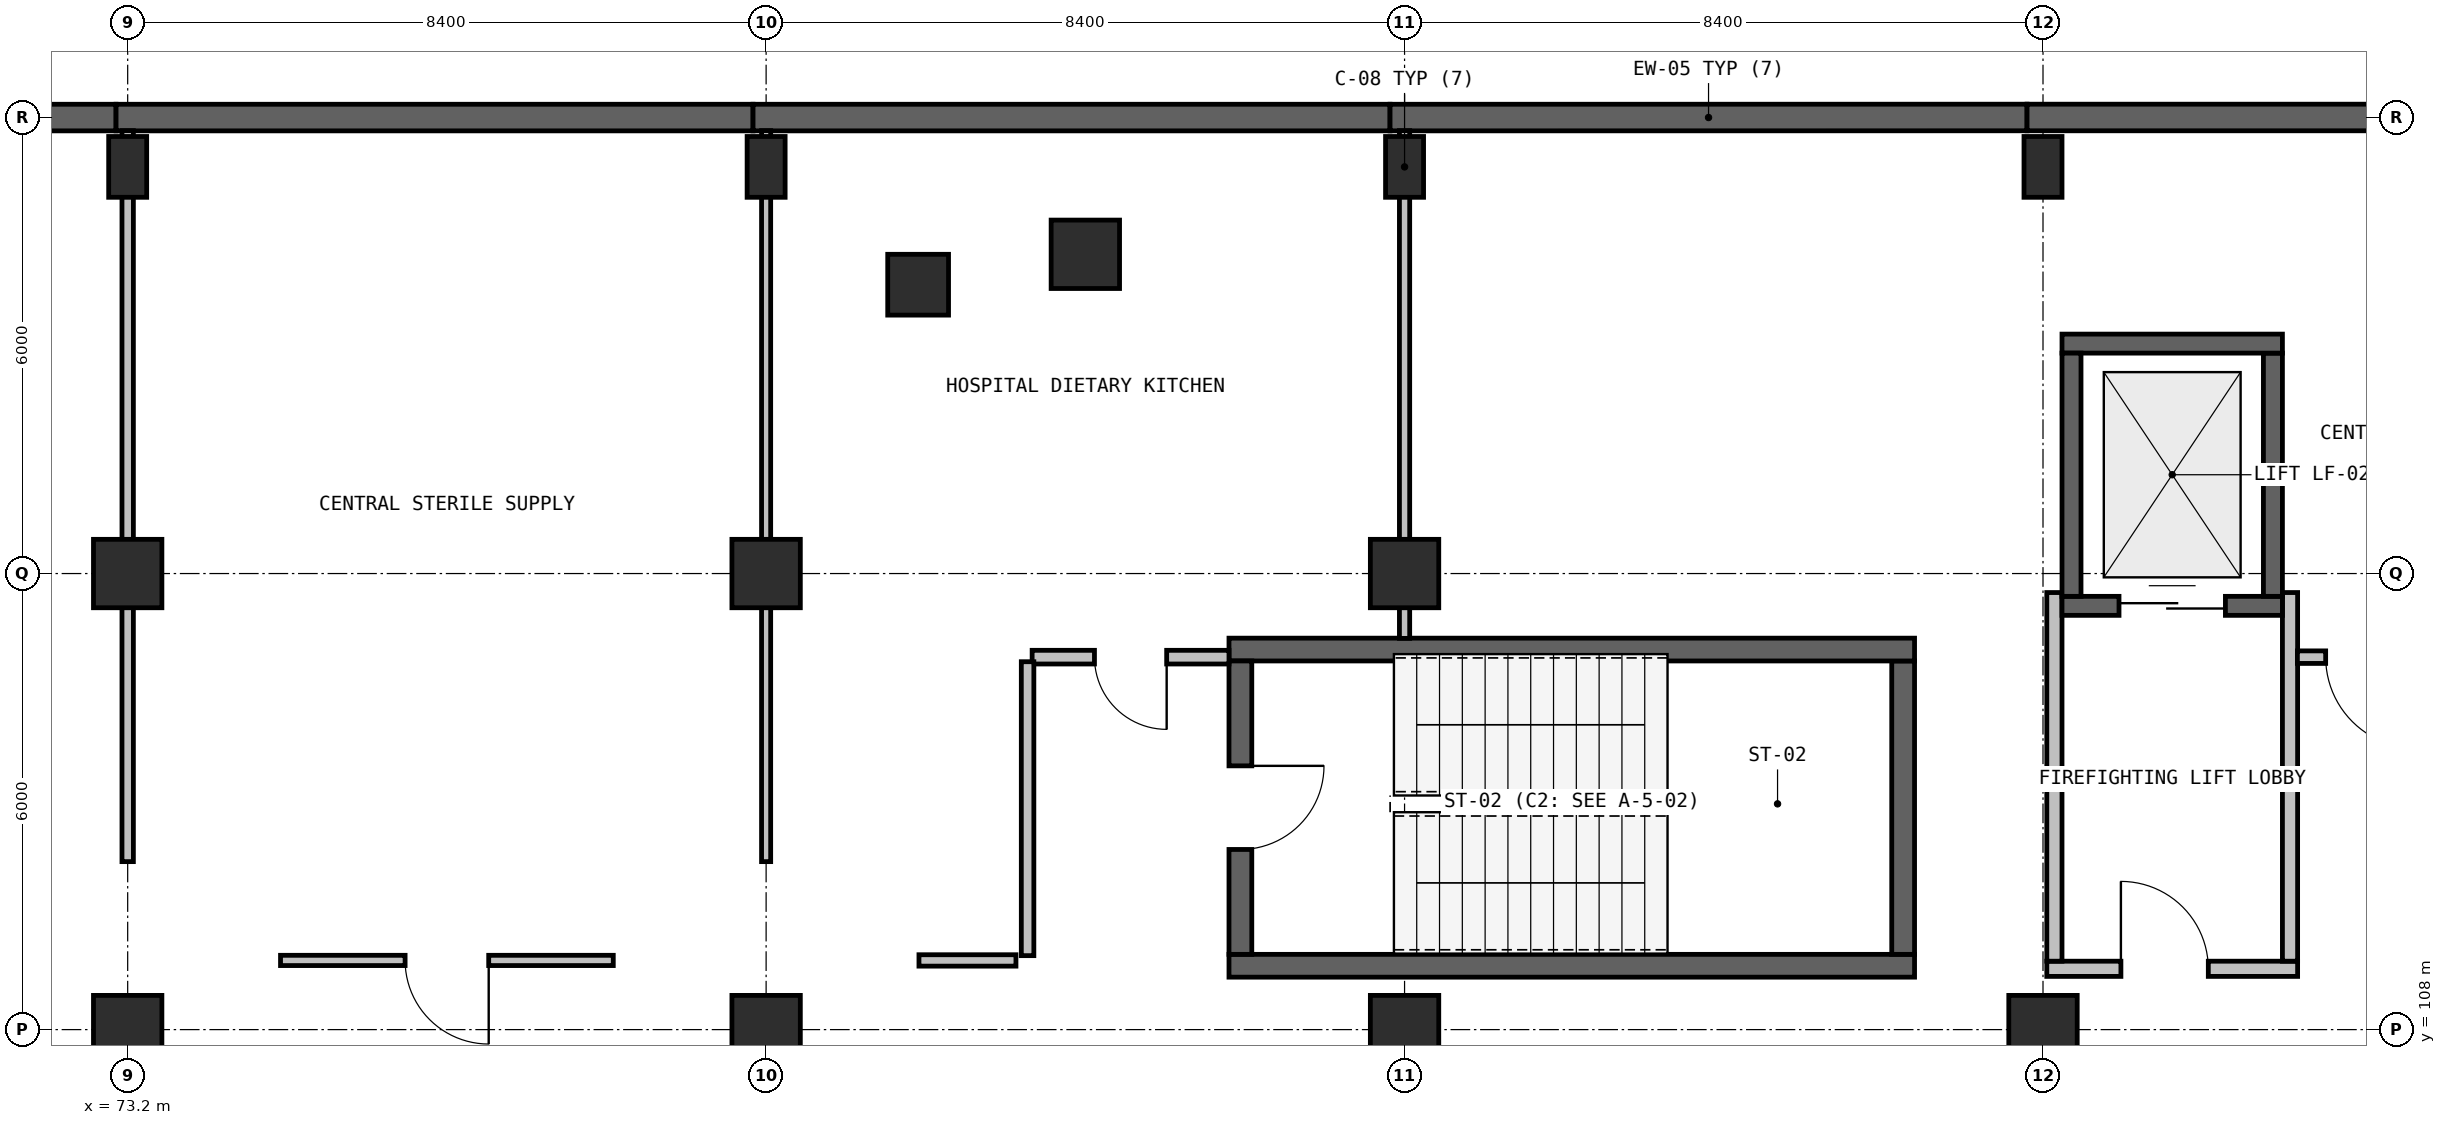
"""IFC4 building model, lengths in metres.
Left out: names, types, materials, properties, quantities, classifications, styles, units other than length and angle.
Written with IfcOpenShell. Run it as: python <this file> out.ifc"""

import sys

from ifc_helpers import new_model, si_unit, direction, frame, frame_2d, origin, origin_2d, place, context, subcontext, project, spatial, rectangle, extrude, element, fill, save


model = new_model("IFC4")
c1 = context("Model", 3, precision=1e-05, world=origin(), true_north=direction((0.0, 1.0)))
c2 = subcontext(c1, "Body", "Model", "MODEL_VIEW")
j1 = project(units=[si_unit("LENGTHUNIT", "METRE"), si_unit("PLANEANGLEUNIT", "RADIAN")], contexts=[c1])
p1 = place(None, origin())
s1 = spatial("IfcSite", under=j1, at=p1, CompositionType="ELEMENT")
p2 = place(p1, origin())
s2 = spatial("IfcBuilding", under=s1, at=p2, CompositionType="ELEMENT")
p3 = place(p2, frame((0.0, 0.0, -4.8)))
s3 = spatial("IfcBuildingStorey", under=s2, at=p3, CompositionType="ELEMENT", Elevation=-4.8)
p4 = place(p3, frame((83.6, 117.8, 0.0), z_axis=(0.0, 0.0, 1.0), x_axis=(1.0, 0.0, 0.0)))
e1 = element("IfcColumn", 1, at=p4, inside=s3, PredefinedType="COLUMN", context=c2, shape_type="SweptSolid", body=[
    extrude(rectangle(XDim=0.8, YDim=0.8, at=origin_2d()), origin(), (0.0, 0.0, 1.0), 4.8),
])
for number, where, z_axis, x_axis in (
    (2, (85.8, 118.2, 0.0), (0.0, 0.0, 1.0), (1.0, 0.0, 0.0)),
    (3, (73.2, 108.0, 0.0), (0.0, 0.0, 1.0), (1.0, 0.0, 0.0)),
    (4, (73.2, 114.0, 0.0), (0.0, 0.0, 1.0), (1.0, 0.0, 0.0)),
):
    element("IfcColumn", number, at=place(p3, frame(where, z_axis=z_axis, x_axis=x_axis)), inside=s3, PredefinedType="COLUMN", context=c2, shape_type="SweptSolid", body=[
        extrude(rectangle(XDim=0.9, YDim=0.9, at=origin_2d()), origin(), (0.0, 0.0, 1.0), 4.8),
    ])
p5 = place(p3, frame((73.2, 119.35, 0.0), z_axis=(0.0, 0.0, 1.0), x_axis=(1.0, 0.0, 0.0)))
e5 = element("IfcColumn", 5, at=p5, inside=s3, PredefinedType="COLUMN", context=c2, shape_type="SweptSolid", body=[
    extrude(rectangle(XDim=0.5, YDim=0.8, at=origin_2d()), origin(), (0.0, 0.0, 1.0), 4.8),
])
for number, where, z_axis, x_axis in (
    (6, (81.6, 108.0, 0.0), (0.0, 0.0, 1.0), (1.0, 0.0, 0.0)),
    (7, (81.6, 114.0, 0.0), (0.0, 0.0, 1.0), (1.0, 0.0, 0.0)),
):
    element("IfcColumn", number, at=place(p3, frame(where, z_axis=z_axis, x_axis=x_axis)), inside=s3, PredefinedType="COLUMN", context=c2, shape_type="SweptSolid", body=[
        extrude(rectangle(XDim=0.9, YDim=0.9, at=origin_2d()), origin(), (0.0, 0.0, 1.0), 4.8),
    ])
p6 = place(p3, frame((81.6, 119.35, 0.0), z_axis=(0.0, 0.0, 1.0), x_axis=(1.0, 0.0, 0.0)))
e8 = element("IfcColumn", 8, at=p6, inside=s3, PredefinedType="COLUMN", context=c2, shape_type="SweptSolid", body=[
    extrude(rectangle(XDim=0.5, YDim=0.8, at=origin_2d()), origin(), (0.0, 0.0, 1.0), 4.8),
])
for number, where, z_axis, x_axis in (
    (9, (90.0, 108.0, 0.0), (0.0, 0.0, 1.0), (1.0, 0.0, 0.0)),
    (10, (90.0, 114.0, 0.0), (0.0, 0.0, 1.0), (1.0, 0.0, 0.0)),
):
    element("IfcColumn", number, at=place(p3, frame(where, z_axis=z_axis, x_axis=x_axis)), inside=s3, PredefinedType="COLUMN", context=c2, shape_type="SweptSolid", body=[
        extrude(rectangle(XDim=0.9, YDim=0.9, at=origin_2d()), origin(), (0.0, 0.0, 1.0), 4.8),
    ])
p7 = place(p3, frame((90.0, 119.35, 0.0), z_axis=(0.0, 0.0, 1.0), x_axis=(1.0, 0.0, 0.0)))
e11 = element("IfcColumn", 11, at=p7, inside=s3, PredefinedType="COLUMN", context=c2, shape_type="SweptSolid", body=[
    extrude(rectangle(XDim=0.5, YDim=0.8, at=origin_2d()), origin(), (0.0, 0.0, 1.0), 4.8),
])
p8 = place(p3, frame((98.4, 108.0, 0.0), z_axis=(0.0, 0.0, 1.0), x_axis=(1.0, 0.0, 0.0)))
e12 = element("IfcColumn", 12, at=p8, inside=s3, PredefinedType="COLUMN", context=c2, shape_type="SweptSolid", body=[
    extrude(rectangle(XDim=0.9, YDim=0.9, at=origin_2d()), origin(), (0.0, 0.0, 1.0), 4.8),
])
p9 = place(p3, frame((98.4, 119.35, 0.0), z_axis=(0.0, 0.0, 1.0), x_axis=(1.0, 0.0, 0.0)))
e13 = element("IfcColumn", 13, at=p9, inside=s3, PredefinedType="COLUMN", context=c2, shape_type="SweptSolid", body=[
    extrude(rectangle(XDim=0.5, YDim=0.8, at=origin_2d()), origin(), (0.0, 0.0, 1.0), 4.8),
])
p10 = place(p3, frame((64.666, 119.999, 0.0), z_axis=(0.0, 0.0, 1.0), x_axis=(1.0, 0.0, 0.0)))
e14 = element("IfcWall", 14, at=p10, inside=s3, PredefinedType="SHEAR", context=c2, shape_type="SweptSolid", body=[
    extrude(rectangle(XDim=8.381, YDim=0.35, at=frame_2d((4.19, 0.0))), origin(), (0.0, 0.0, 1.0), 4.45),
])
p11 = place(p3, frame((73.047, 119.999, 0.0), z_axis=(0.0, 0.0, 1.0), x_axis=(1.0, 0.0, 0.0)))
e15 = element("IfcWall", 15, at=p11, inside=s3, PredefinedType="SHEAR", context=c2, shape_type="SweptSolid", body=[
    extrude(rectangle(XDim=8.381, YDim=0.35, at=frame_2d((4.19, 0.0))), origin(), (0.0, 0.0, 1.0), 4.45),
])
p12 = place(p3, frame((81.428, 119.999, 0.0), z_axis=(0.0, 0.0, 1.0), x_axis=(1.0, 0.0, 0.0)))
e16 = element("IfcWall", 16, at=p12, inside=s3, PredefinedType="SHEAR", context=c2, shape_type="SweptSolid", body=[
    extrude(rectangle(XDim=8.381, YDim=0.35, at=frame_2d((4.19, 0.0))), origin(), (0.0, 0.0, 1.0), 4.45),
])
p13 = place(p3, frame((89.809, 119.999, 0.0), z_axis=(0.0, 0.0, 1.0), x_axis=(0.999999993211, 0.000116522954, 0.0)))
e17 = element("IfcWall", 17, at=p13, inside=s3, PredefinedType="SHEAR", context=c2, shape_type="SweptSolid", body=[
    extrude(rectangle(XDim=8.381, YDim=0.35, at=frame_2d((4.19, 0.0))), origin(), (0.0, 0.0, 1.0), 4.45),
])
p14 = place(p3, frame((98.19, 120.0, 0.0), z_axis=(0.0, 0.0, 1.0), x_axis=(1.0, 0.0, 0.0)))
e18 = element("IfcWall", 18, at=p14, inside=s3, PredefinedType="SHEAR", context=c2, shape_type="SweptSolid", body=[
    extrude(rectangle(XDim=8.381, YDim=0.35, at=frame_2d((4.19, 0.0))), origin(), (0.0, 0.0, 1.0), 4.45),
])
p15 = place(p3, frame((87.69, 108.84, 0.0), z_axis=(0.0, 0.0, 1.0), x_axis=(1.0, 0.0, 0.0)))
e19 = element("IfcWall", 19, at=p15, inside=s3, PredefinedType="SHEAR", context=c2, shape_type="SweptSolid", body=[
    extrude(rectangle(XDim=9.02, YDim=0.3, at=frame_2d((4.51, 0.0))), origin(), (0.0, 0.0, 1.0), 4.45),
])
p16 = place(p3, frame((96.56, 108.99, 0.0), z_axis=(0.0, 0.0, 1.0), x_axis=(0.0, 1.0, 0.0)))
e20 = element("IfcWall", 20, at=p16, inside=s3, PredefinedType="SHEAR", context=c2, shape_type="SweptSolid", body=[
    extrude(rectangle(XDim=3.86, YDim=0.3, at=frame_2d((1.93, 0.0))), origin(), (0.0, 0.0, 1.0), 4.45),
])
p17 = place(p3, frame((96.71, 113.0, 0.0), z_axis=(0.0, 0.0, 1.0), x_axis=(-1.0, 0.0, 0.0)))
e21 = element("IfcWall", 21, at=p17, inside=s3, PredefinedType="SHEAR", context=c2, shape_type="SweptSolid", body=[
    extrude(rectangle(XDim=9.02, YDim=0.3, at=frame_2d((4.51, 0.0))), origin(), (0.0, 0.0, 1.0), 4.45),
])
p18 = place(p3, frame((87.84, 112.85, 0.0), z_axis=(0.0, 0.0, 1.0), x_axis=(0.0, -1.0, 0.0)))
e22 = element("IfcWall", 22, at=p18, inside=s3, PredefinedType="SHEAR", context=c2, shape_type="SweptSolid", body=[
    extrude(rectangle(XDim=3.86, YDim=0.3, at=frame_2d((1.93, 0.0))), origin(), (0.0, 0.0, 1.0), 4.45),
])
p19 = place(p18, frame((1.38, 0.0, 0.0)))
e23 = element("IfcOpeningElement", 23, at=p19, cuts=e22, PredefinedType="OPENING", context=c2, shape_type="SweptSolid", body=[
    extrude(rectangle(XDim=1.1, YDim=2.15, at=frame_2d((0.55, 1.075))), frame((0.0, 0.16, 0.0), z_axis=(0.0, -1.0, 0.0), x_axis=(1.0, 0.0, 0.0)), (0.0, 0.0, 1.0), 0.32),
])
p20 = place(p3, frame((98.45, 108.8, 0.0), z_axis=(0.0, 0.0, 1.0), x_axis=(1.0, 0.0, 0.0)))
e24 = element("IfcWall", 24, at=p20, inside=s3, PredefinedType="SOLIDWALL", context=c2, shape_type="SweptSolid", body=[
    extrude(rectangle(XDim=3.3, YDim=0.2, at=frame_2d((1.65, 0.0))), origin(), (0.0, 0.0, 1.0), 4.45),
])
p21 = place(p20, frame((0.975, 0.0, 0.0)))
e25 = element("IfcOpeningElement", 25, at=p21, cuts=e24, PredefinedType="OPENING", context=c2, shape_type="SweptSolid", body=[
    extrude(rectangle(XDim=1.15, YDim=2.15, at=frame_2d((0.575, 1.075))), frame((0.0, 0.11, 0.0), z_axis=(0.0, -1.0, 0.0), x_axis=(1.0, 0.0, 0.0)), (0.0, 0.0, 1.0), 0.22),
])
p22 = place(p3, frame((101.65, 108.9, 0.0), z_axis=(0.0, 0.0, 1.0), x_axis=(0.0, 1.0, 0.0)))
e26 = element("IfcWall", 26, at=p22, inside=s3, PredefinedType="SOLIDWALL", context=c2, shape_type="SweptSolid", body=[
    extrude(rectangle(XDim=4.85, YDim=0.2, at=frame_2d((2.425, 0.0))), origin(), (0.0, 0.0, 1.0), 4.45),
])
p23 = place(p3, frame((98.55, 113.75, 0.0), z_axis=(0.0, 0.0, 1.0), x_axis=(0.0, -1.0, 0.0)))
e27 = element("IfcWall", 27, at=p23, inside=s3, PredefinedType="SOLIDWALL", context=c2, shape_type="SweptSolid", body=[
    extrude(rectangle(XDim=4.85, YDim=0.2, at=frame_2d((2.425, 0.0))), origin(), (0.0, 0.0, 1.0), 3.7),
])
p24 = place(p3, frame((98.65, 113.575, 0.0), z_axis=(0.0, 0.0, 1.0), x_axis=(1.0, 0.0, 0.0)))
e28 = element("IfcWall", 28, at=p24, inside=s3, PredefinedType="SHEAR", context=c2, shape_type="SweptSolid", body=[
    extrude(rectangle(XDim=2.9, YDim=0.25, at=frame_2d((1.45, 0.0))), origin(), (0.0, 0.0, 1.0), 4.45),
])
p25 = place(p24, frame((0.75, 0.0, 0.0)))
e29 = element("IfcOpeningElement", 29, at=p25, cuts=e28, PredefinedType="OPENING", context=c2, shape_type="SweptSolid", body=[
    extrude(rectangle(XDim=1.4, YDim=2.15, at=frame_2d((0.7, 1.075))), frame((0.0, 0.135, 0.0), z_axis=(0.0, -1.0, 0.0), x_axis=(1.0, 0.0, 0.0)), (0.0, 0.0, 1.0), 0.27),
])
p26 = place(p3, frame((101.425, 113.7, 0.0), z_axis=(0.0, 0.0, 1.0), x_axis=(0.0, 1.0, 0.0)))
e30 = element("IfcWall", 30, at=p26, inside=s3, PredefinedType="SHEAR", context=c2, shape_type="SweptSolid", body=[
    extrude(rectangle(XDim=3.2, YDim=0.25, at=frame_2d((1.6, 0.0))), origin(), (0.0, 0.0, 1.0), 4.45),
])
p27 = place(p3, frame((101.55, 117.025, 0.0), z_axis=(0.0, 0.0, 1.0), x_axis=(-1.0, 0.0, 0.0)))
e31 = element("IfcWall", 31, at=p27, inside=s3, PredefinedType="SHEAR", context=c2, shape_type="SweptSolid", body=[
    extrude(rectangle(XDim=2.9, YDim=0.25, at=frame_2d((1.45, 0.0))), origin(), (0.0, 0.0, 1.0), 4.45),
])
p28 = place(p3, frame((98.775, 116.9, 0.0), z_axis=(0.0, 0.0, 1.0), x_axis=(0.0, -1.0, 0.0)))
e32 = element("IfcWall", 32, at=p28, inside=s3, PredefinedType="SHEAR", context=c2, shape_type="SweptSolid", body=[
    extrude(rectangle(XDim=3.2, YDim=0.25, at=frame_2d((1.6, 0.0))), origin(), (0.0, 0.0, 1.0), 4.45),
])
p29 = place(p3, frame((73.2, 119.827, 0.0), z_axis=(0.0, 0.0, 1.0), x_axis=(0.0, -1.0, 0.0)))
e33 = element("IfcWall", 33, at=p29, inside=s3, PredefinedType="PARTITIONING", context=c2, shape_type="SweptSolid", body=[
    extrude(rectangle(XDim=9.617, YDim=0.15, at=frame_2d((4.809, 0.0))), origin(), (0.0, 0.0, 1.0), 3.7),
])
p30 = place(p3, frame((79.589, 108.91, 0.0), z_axis=(0.0, 0.0, 1.0), x_axis=(-1.0, 0.0, 0.0)))
e34 = element("IfcWall", 34, at=p30, inside=s3, PredefinedType="PARTITIONING", context=c2, shape_type="SweptSolid", body=[
    extrude(rectangle(XDim=4.378, YDim=0.135, at=frame_2d((2.189, 0.0))), origin(), (0.0, 0.0, 1.0), 4.45),
])
p31 = place(p30, frame((1.639, 0.0, 0.0)))
e35 = element("IfcOpeningElement", 35, at=p31, cuts=e34, PredefinedType="OPENING", context=c2, shape_type="SweptSolid", body=[
    extrude(rectangle(XDim=1.1, YDim=2.15, at=frame_2d((0.55, 1.075))), frame((0.0, 0.077, 0.0), z_axis=(0.0, -1.0, 0.0), x_axis=(1.0, 0.0, 0.0)), (0.0, 0.0, 1.0), 0.155),
])
p32 = place(p3, frame((81.6, 119.827, 0.0), z_axis=(0.0, 0.0, 1.0), x_axis=(0.0, -1.0, 0.0)))
e36 = element("IfcWall", 36, at=p32, inside=s3, PredefinedType="PARTITIONING", context=c2, shape_type="SweptSolid", body=[
    extrude(rectangle(XDim=9.617, YDim=0.12, at=frame_2d((4.809, 0.0))), origin(), (0.0, 0.0, 1.0), 3.7),
])
p33 = place(p3, frame((87.69, 112.9, 0.0), z_axis=(0.0, 0.0, 1.0), x_axis=(-1.0, 0.0, 0.0)))
e37 = element("IfcWall", 37, at=p33, inside=s3, PredefinedType="PARTITIONING", context=c2, shape_type="SweptSolid", body=[
    extrude(rectangle(XDim=2.59, YDim=0.18, at=frame_2d((1.295, 0.0))), origin(), (0.0, 0.0, 1.0), 4.45),
])
p34 = place(p33, frame((0.82, 0.0, 0.0)))
e38 = element("IfcOpeningElement", 38, at=p34, cuts=e37, PredefinedType="OPENING", context=c2, shape_type="SweptSolid", body=[
    extrude(rectangle(XDim=0.95, YDim=2.1, at=frame_2d((0.475, 1.05))), frame((0.0, 0.1, 0.0), z_axis=(0.0, -1.0, 0.0), x_axis=(1.0, 0.0, 0.0)), (0.0, 0.0, 1.0), 0.2),
])
p35 = place(p3, frame((85.04, 112.84, 0.0), z_axis=(0.0, 0.0, 1.0), x_axis=(0.0, -1.0, 0.0)))
e39 = element("IfcWall", 39, at=p35, inside=s3, PredefinedType="PARTITIONING", context=c2, shape_type="SweptSolid", body=[
    extrude(rectangle(XDim=3.867, YDim=0.165, at=frame_2d((1.934, 0.0))), origin(), (0.0, 0.0, 1.0), 4.45),
])
p36 = place(p3, frame((84.887, 108.91, 0.0), z_axis=(0.0, 0.0, 1.0), x_axis=(-1.0, 0.0, 0.0)))
e40 = element("IfcWall", 40, at=p36, inside=s3, PredefinedType="PARTITIONING", context=c2, shape_type="SweptSolid", body=[
    extrude(rectangle(XDim=1.276, YDim=0.15, at=frame_2d((0.638, 0.0))), origin(), (0.0, 0.0, 1.0), 4.45),
])
p37 = place(p3, frame((90.0, 119.827, 0.0), z_axis=(0.0, 0.0, 1.0), x_axis=(0.0, -1.0, 0.0)))
e41 = element("IfcWall", 41, at=p37, inside=s3, PredefinedType="PARTITIONING", context=c2, shape_type="SweptSolid", body=[
    extrude(rectangle(XDim=6.68, YDim=0.135, at=frame_2d((3.34, 0.0))), origin(), (0.0, 0.0, 1.0), 3.7),
])
p38 = place(p3, frame((103.69, 112.9, 0.0), z_axis=(0.0, 0.0, 1.0), x_axis=(-1.0, 0.0, 0.0)))
e42 = element("IfcWall", 42, at=p38, inside=s3, PredefinedType="PARTITIONING", context=c2, shape_type="SweptSolid", body=[
    extrude(rectangle(XDim=1.943, YDim=0.165, at=frame_2d((0.971, 0.0))), origin(), (0.0, 0.0, 1.0), 4.45),
])
p39 = place(p38, frame((0.371, 0.0, 0.0)))
e43 = element("IfcOpeningElement", 43, at=p39, cuts=e42, PredefinedType="OPENING", context=c2, shape_type="SweptSolid", body=[
    extrude(rectangle(XDim=1.2, YDim=2.15, at=frame_2d((0.6, 1.075))), frame((0.0, 0.093, 0.0), z_axis=(0.0, -1.0, 0.0), x_axis=(1.0, 0.0, 0.0)), (0.0, 0.0, 1.0), 0.185),
])
p40 = place(p19, origin())
e44 = element("IfcDoor", 44, at=p40, inside=s3, OperationType="SINGLE_SWING_RIGHT", PredefinedType="DOOR", context=c2, shape_type="SweptSolid", body=[
    extrude(rectangle(XDim=1.1, YDim=2.15, at=frame_2d((0.55, 1.075))), frame((0.0, 0.025, 0.0), z_axis=(0.0, -1.0, 0.0), x_axis=(1.0, 0.0, 0.0)), (0.0, 0.0, 1.0), 0.05),
])
fill(e23, e44)
p41 = place(p21, origin())
e45 = element("IfcDoor", 45, at=p41, inside=s3, OperationType="SINGLE_SWING_LEFT", PredefinedType="DOOR", context=c2, shape_type="SweptSolid", body=[
    extrude(rectangle(XDim=1.15, YDim=2.15, at=frame_2d((0.575, 1.075))), frame((0.0, 0.025, 0.0), z_axis=(0.0, -1.0, 0.0), x_axis=(1.0, 0.0, 0.0)), (0.0, 0.0, 1.0), 0.05),
])
fill(e25, e45)
p42 = place(p25, origin())
e46 = element("IfcDoor", 46, at=p42, inside=s3, OperationType="DOUBLE_DOOR_SLIDING", PredefinedType="DOOR", context=c2, shape_type="SweptSolid", body=[
    extrude(rectangle(XDim=1.4, YDim=2.15, at=frame_2d((0.7, 1.075))), frame((0.0, 0.025, 0.0), z_axis=(0.0, -1.0, 0.0), x_axis=(1.0, 0.0, 0.0)), (0.0, 0.0, 1.0), 0.05),
])
fill(e29, e46)
p43 = place(p31, origin())
e47 = element("IfcDoor", 47, at=p43, inside=s3, OperationType="SINGLE_SWING_LEFT", PredefinedType="DOOR", context=c2, shape_type="SweptSolid", body=[
    extrude(rectangle(XDim=1.1, YDim=2.15, at=frame_2d((0.55, 1.075))), frame((0.0, 0.025, 0.0), z_axis=(0.0, -1.0, 0.0), x_axis=(1.0, 0.0, 0.0)), (0.0, 0.0, 1.0), 0.05),
])
fill(e35, e47)
p44 = place(p34, origin())
e48 = element("IfcDoor", 48, at=p44, inside=s3, OperationType="SINGLE_SWING_RIGHT", PredefinedType="DOOR", context=c2, shape_type="SweptSolid", body=[
    extrude(rectangle(XDim=0.95, YDim=2.1, at=frame_2d((0.475, 1.05))), frame((0.0, 0.025, 0.0), z_axis=(0.0, -1.0, 0.0), x_axis=(1.0, 0.0, 0.0)), (0.0, 0.0, 1.0), 0.05),
])
fill(e38, e48)
p45 = place(p39, origin())
e49 = element("IfcDoor", 49, at=p45, inside=s3, OperationType="SINGLE_SWING_LEFT", PredefinedType="DOOR", context=c2, shape_type="SweptSolid", body=[
    extrude(rectangle(XDim=1.2, YDim=2.15, at=frame_2d((0.6, 1.075))), frame((0.0, 0.025, 0.0), z_axis=(0.0, -1.0, 0.0), x_axis=(1.0, 0.0, 0.0)), (0.0, 0.0, 1.0), 0.05),
])
fill(e43, e49)
save(model, sys.argv[1])
